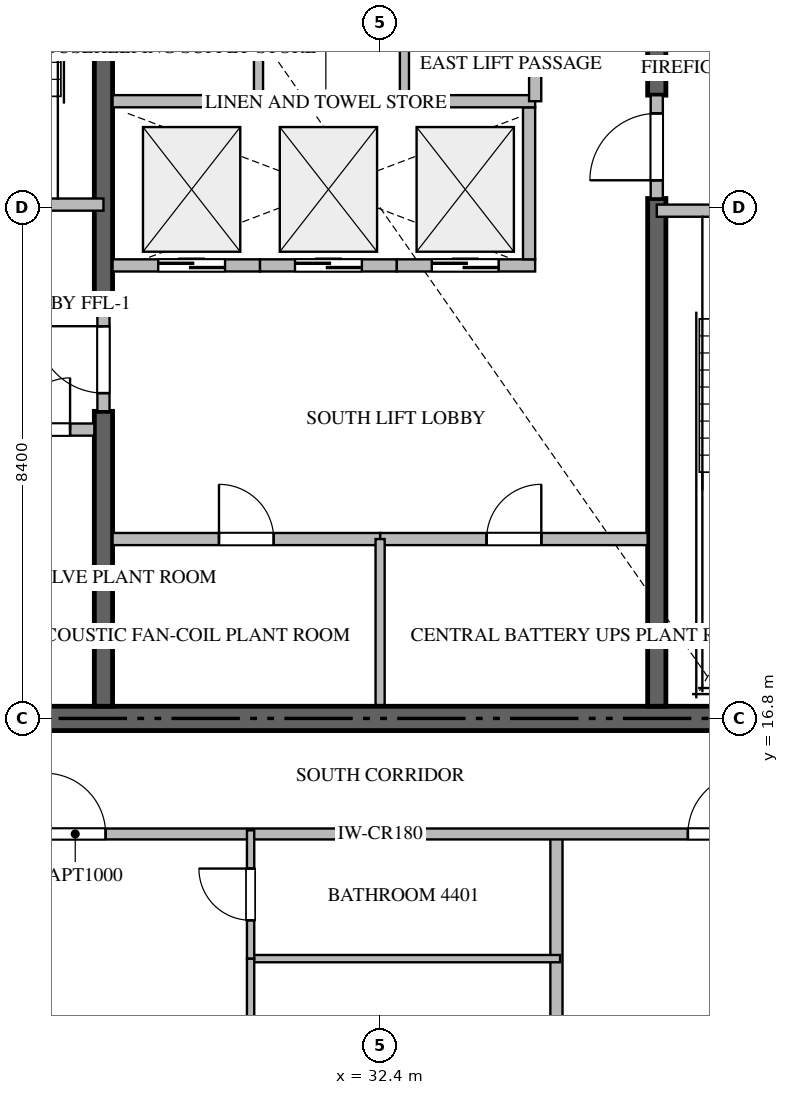
"""IFC4 building model, lengths in metres.
Left out: names, types, materials, properties, quantities, classifications, styles, units other than length and angle.
Written with IfcOpenShell. Run it as: python <this file> out.ifc"""

import sys

from ifc_helpers import new_model, si_unit, direction, frame, frame_2d, origin, place, context, subcontext, project, spatial, rectangle, extrude, source, transform, mapped, element, fill, save


model = new_model("IFC4")
c1 = context("Model", 3, precision=1e-05, world=origin(), true_north=direction((0.0, 1.0)))
c2 = subcontext(c1, "Body", "Model", "MODEL_VIEW")
j1 = project(units=[si_unit("LENGTHUNIT", "METRE"), si_unit("PLANEANGLEUNIT", "RADIAN")], contexts=[c1])
p1 = place(None, origin())
s1 = spatial("IfcSite", under=j1, at=p1, CompositionType="ELEMENT")
p2 = place(p1, origin())
s2 = spatial("IfcBuilding", under=s1, at=p2, CompositionType="ELEMENT")
p3 = place(p2, frame((0.0, 0.0, 176.4)))
s3 = spatial("IfcBuildingStorey", under=s2, at=p3, CompositionType="ELEMENT", Elevation=176.4)
p4 = place(p3, frame((23.4, 16.8, -0.26), z_axis=(0.0, 0.0, 1.0), x_axis=(1.0, 0.0, 0.0)))
e1 = element("IfcWall", 1, at=p4, inside=s3, PredefinedType="SHEAR", context=c2, shape_type="SweptSolid", body=[
    extrude(rectangle(XDim=18.0, YDim=0.4, at=frame_2d((9.0, 0.0))), origin(), (0.0, 0.0, 1.0), 3.748),
])
p5 = place(p3, frame((27.85, 17.0, -0.26), z_axis=(0.0, 0.0, 1.0), x_axis=(0.0, 1.0, 0.0)))
e2 = element("IfcWall", 2, at=p5, inside=s3, PredefinedType="SHEAR", context=c2, shape_type="SweptSolid", body=[
    extrude(rectangle(XDim=4.85, YDim=0.3, at=frame_2d((2.425, 0.0))), origin(), (0.0, 0.0, 1.0), 3.748),
])
p6 = place(p3, frame((27.85, 23.55, -0.26), z_axis=(0.0, 0.0, 1.0), x_axis=(0.0, 1.0, 0.0)))
e3 = element("IfcWall", 3, at=p6, inside=s3, PredefinedType="SHEAR", context=c2, shape_type="SweptSolid", body=[
    extrude(rectangle(XDim=9.85, YDim=0.3, at=frame_2d((4.925, 0.0))), origin(), (0.0, 0.0, 1.0), 3.748),
])
p7 = place(p3, frame((36.95, 17.0, -0.26), z_axis=(0.0, 0.0, 1.0), x_axis=(0.0, 1.0, 0.0)))
e4 = element("IfcWall", 4, at=p7, inside=s3, PredefinedType="SHEAR", context=c2, shape_type="SweptSolid", body=[
    extrude(rectangle(XDim=8.35, YDim=0.3, at=frame_2d((4.175, 0.0))), origin(), (0.0, 0.0, 1.0), 3.748),
])
p8 = place(p3, frame((36.95, 27.05, -0.26), z_axis=(0.0, 0.0, 1.0), x_axis=(0.0, 1.0, 0.0)))
e5 = element("IfcWall", 5, at=p8, inside=s3, PredefinedType="SHEAR", context=c2, shape_type="SweptSolid", body=[
    extrude(rectangle(XDim=6.35, YDim=0.3, at=frame_2d((3.175, 0.0))), origin(), (0.0, 0.0, 1.0), 3.748),
])
p9 = place(p3, frame((23.4, 25.25, 0.0), z_axis=(0.0, 0.0, 1.0), x_axis=(1.0, 0.0, 0.0)))
e6 = element("IfcWall", 6, at=p9, inside=s3, PredefinedType="STANDARD", context=c2, shape_type="SweptSolid", body=[
    extrude(rectangle(XDim=4.45, YDim=0.2, at=frame_2d((2.225, 0.0))), origin(), (0.0, 0.0, 1.0), 3.49),
])
p10 = place(p9, frame((1.65, 0.0, 0.0)))
e7 = element("IfcOpeningElement", 7, at=p10, cuts=e6, PredefinedType="OPENING", context=c2, shape_type="SweptSolid", body=[
    extrude(rectangle(XDim=1.1, YDim=2.15, at=frame_2d((0.55, 1.075))), frame((0.0, 0.11, 0.0), z_axis=(0.0, -1.0, 0.0), x_axis=(1.0, 0.0, 0.0)), (0.0, 0.0, 1.0), 0.22),
])
p11 = place(p3, frame((36.95, 25.15, 0.0), z_axis=(0.0, 0.0, 1.0), x_axis=(1.0, 0.0, 0.0)))
e8 = element("IfcWall", 8, at=p11, inside=s3, PredefinedType="STANDARD", context=c2, shape_type="SweptSolid", body=[
    extrude(rectangle(XDim=4.45, YDim=0.2, at=frame_2d((2.225, 0.0))), origin(), (0.0, 0.0, 1.0), 3.49),
])
p12 = place(p11, frame((1.65, 0.0, 0.0)))
e9 = element("IfcOpeningElement", 9, at=p12, cuts=e8, PredefinedType="OPENING", context=c2, shape_type="SweptSolid", body=[
    extrude(rectangle(XDim=1.1, YDim=2.15, at=frame_2d((0.55, 1.075))), frame((0.0, 0.11, 0.0), z_axis=(0.0, -1.0, 0.0), x_axis=(1.0, 0.0, 0.0)), (0.0, 0.0, 1.0), 0.22),
])
p13 = place(p3, frame((28.0, 24.25, 0.0), z_axis=(0.0, 0.0, 1.0), x_axis=(1.0, 0.0, 0.0)))
e10 = element("IfcWall", 10, at=p13, inside=s3, PredefinedType="STANDARD", context=c2, shape_type="SweptSolid", body=[
    extrude(rectangle(XDim=2.425, YDim=0.2, at=frame_2d((1.212, 0.0))), origin(), (0.0, 0.0, 1.0), 3.49),
])
p14 = place(p13, frame((0.75, 0.0, 0.0)))
e11 = element("IfcOpeningElement", 11, at=p14, cuts=e10, PredefinedType="OPENING", context=c2, shape_type="SweptSolid", body=[
    extrude(rectangle(XDim=1.1, YDim=2.2, at=frame_2d((0.55, 1.1))), frame((0.0, 0.11, 0.0), z_axis=(0.0, -1.0, 0.0), x_axis=(1.0, 0.0, 0.0)), (0.0, 0.0, 1.0), 0.22),
])
p15 = place(p3, frame((30.425, 24.25, 0.0), z_axis=(0.0, 0.0, 1.0), x_axis=(1.0, 0.0, 0.0)))
e12 = element("IfcWall", 12, at=p15, inside=s3, PredefinedType="STANDARD", context=c2, shape_type="SweptSolid", body=[
    extrude(rectangle(XDim=2.25, YDim=0.2, at=frame_2d((1.125, 0.0))), origin(), (0.0, 0.0, 1.0), 3.49),
])
p16 = place(p15, frame((0.575, 0.0, 0.0)))
e13 = element("IfcOpeningElement", 13, at=p16, cuts=e12, PredefinedType="OPENING", context=c2, shape_type="SweptSolid", body=[
    extrude(rectangle(XDim=1.1, YDim=2.2, at=frame_2d((0.55, 1.1))), frame((0.0, 0.11, 0.0), z_axis=(0.0, -1.0, 0.0), x_axis=(1.0, 0.0, 0.0)), (0.0, 0.0, 1.0), 0.22),
])
p17 = place(p3, frame((32.675, 24.25, 0.0), z_axis=(0.0, 0.0, 1.0), x_axis=(1.0, 0.0, 0.0)))
e14 = element("IfcWall", 14, at=p17, inside=s3, PredefinedType="STANDARD", context=c2, shape_type="SweptSolid", body=[
    extrude(rectangle(XDim=2.275, YDim=0.2, at=frame_2d((1.137, 0.0))), origin(), (0.0, 0.0, 1.0), 3.49),
])
p18 = place(p17, frame((0.575, 0.0, 0.0)))
e15 = element("IfcOpeningElement", 15, at=p18, cuts=e14, PredefinedType="OPENING", context=c2, shape_type="SweptSolid", body=[
    extrude(rectangle(XDim=1.1, YDim=2.2, at=frame_2d((0.55, 1.1))), frame((0.0, 0.11, 0.0), z_axis=(0.0, -1.0, 0.0), x_axis=(1.0, 0.0, 0.0)), (0.0, 0.0, 1.0), 0.22),
])
p19 = place(p3, frame((34.85, 24.35, 0.0), z_axis=(0.0, 0.0, 1.0), x_axis=(0.0, 1.0, 0.0)))
e16 = element("IfcWall", 16, at=p19, inside=s3, PredefinedType="STANDARD", context=c2, shape_type="SweptSolid", body=[
    extrude(rectangle(XDim=2.5, YDim=0.2, at=frame_2d((1.25, 0.0))), origin(), (0.0, 0.0, 1.0), 3.49),
])
p20 = place(p3, frame((26.052, 21.55, 0.0), z_axis=(0.0, 0.0, 1.0), x_axis=(1.0, 0.0, 0.0)))
e17 = element("IfcWall", 17, at=p20, inside=s3, PredefinedType="STANDARD", context=c2, shape_type="SweptSolid", body=[
    extrude(rectangle(XDim=1.648, YDim=0.2, at=frame_2d((0.824, 0.0))), origin(), (0.0, 0.0, 1.0), 3.49),
])
p21 = place(p20, frame((0.399, 0.0, 0.0)))
e18 = element("IfcOpeningElement", 18, at=p21, cuts=e17, PredefinedType="OPENING", context=c2, shape_type="SweptSolid", body=[
    extrude(rectangle(XDim=0.85, YDim=2.1, at=frame_2d((0.425, 1.05))), frame((0.0, 0.11, 0.0), z_axis=(0.0, -1.0, 0.0), x_axis=(1.0, 0.0, 0.0)), (0.0, 0.0, 1.0), 0.22),
])
p22 = place(p3, frame((27.85, 21.852, 0.0), z_axis=(0.0, 0.0, 1.0), x_axis=(0.0, 1.0, 0.0)))
e19 = element("IfcWall", 19, at=p22, inside=s3, PredefinedType="STANDARD", context=c2, shape_type="SweptSolid", body=[
    extrude(rectangle(XDim=1.696, YDim=0.2, at=frame_2d((0.848, 0.0))), origin(), (0.0, 0.0, 1.0), 3.49),
])
p23 = place(p22, frame((0.298, 0.0, 0.0)))
e20 = element("IfcOpeningElement", 20, at=p23, cuts=e19, PredefinedType="OPENING", context=c2, shape_type="SweptSolid", body=[
    extrude(rectangle(XDim=1.1, YDim=2.15, at=frame_2d((0.55, 1.075))), frame((0.0, 0.11, 0.0), z_axis=(0.0, -1.0, 0.0), x_axis=(1.0, 0.0, 0.0)), (0.0, 0.0, 1.0), 0.22),
])
p24 = place(p3, frame((36.95, 25.352, 0.0), z_axis=(0.0, 0.0, 1.0), x_axis=(0.0, 1.0, 0.0)))
e21 = element("IfcWall", 21, at=p24, inside=s3, PredefinedType="STANDARD", context=c2, shape_type="SweptSolid", body=[
    extrude(rectangle(XDim=1.696, YDim=0.2, at=frame_2d((0.848, 0.0))), origin(), (0.0, 0.0, 1.0), 3.49),
])
p25 = place(p24, frame((0.298, 0.0, 0.0)))
e22 = element("IfcOpeningElement", 22, at=p25, cuts=e21, PredefinedType="OPENING", context=c2, shape_type="SweptSolid", body=[
    extrude(rectangle(XDim=1.1, YDim=2.15, at=frame_2d((0.55, 1.075))), frame((0.0, 0.11, 0.0), z_axis=(0.0, -1.0, 0.0), x_axis=(1.0, 0.0, 0.0)), (0.0, 0.0, 1.0), 0.22),
])
p26 = place(p3, frame((28.0, 26.95, 0.0), z_axis=(0.0, 0.0, 1.0), x_axis=(1.0, 0.0, 0.0)))
e23 = element("IfcWall", 23, at=p26, inside=s3, PredefinedType="STANDARD", context=c2, shape_type="SweptSolid", body=[
    extrude(rectangle(XDim=6.95, YDim=0.2, at=frame_2d((3.475, 0.0))), origin(), (0.0, 0.0, 1.0), 3.49),
])
p27 = place(p3, frame((34.95, 26.95, 0.0), z_axis=(0.0, 0.0, 1.0), x_axis=(0.0, 1.0, 0.0)))
e24 = element("IfcWall", 24, at=p27, inside=s3, PredefinedType="STANDARD", context=c2, shape_type="SweptSolid", body=[
    extrude(rectangle(XDim=3.6, YDim=0.2, at=frame_2d((1.8, 0.0))), origin(), (0.0, 0.0, 1.0), 3.49),
])
p28 = place(p27, frame((1.35, 0.0, 0.0)))
e25 = element("IfcOpeningElement", 25, at=p28, cuts=e24, PredefinedType="OPENING", context=c2, shape_type="SweptSolid", body=[
    extrude(rectangle(XDim=0.9, YDim=2.1, at=frame_2d((0.45, 1.05))), frame((0.0, 0.11, 0.0), z_axis=(0.0, -1.0, 0.0), x_axis=(1.0, 0.0, 0.0)), (0.0, 0.0, 1.0), 0.22),
])
p29 = place(p3, frame((32.8, 26.95, 0.0), z_axis=(0.0, 0.0, 1.0), x_axis=(0.0, 1.0, 0.0)))
e26 = element("IfcWall", 26, at=p29, inside=s3, PredefinedType="PARTITIONING", context=c2, shape_type="SweptSolid", body=[
    extrude(rectangle(XDim=3.6, YDim=0.15, at=frame_2d((1.8, 0.0))), origin(), (0.0, 0.0, 1.0), 3.49),
])
p30 = place(p29, frame((1.375, 0.0, 0.0)))
e27 = element("IfcOpeningElement", 27, at=p30, cuts=e26, PredefinedType="OPENING", context=c2, shape_type="SweptSolid", body=[
    extrude(rectangle(XDim=0.85, YDim=2.1, at=frame_2d((0.425, 1.05))), frame((0.0, 0.085, 0.0), z_axis=(0.0, -1.0, 0.0), x_axis=(1.0, 0.0, 0.0)), (0.0, 0.0, 1.0), 0.17),
])
p31 = place(p3, frame((30.4, 26.95, 0.0), z_axis=(0.0, 0.0, 1.0), x_axis=(0.0, 1.0, 0.0)))
e28 = element("IfcWall", 28, at=p31, inside=s3, PredefinedType="PARTITIONING", context=c2, shape_type="SweptSolid", body=[
    extrude(rectangle(XDim=3.6, YDim=0.15, at=frame_2d((1.8, 0.0))), origin(), (0.0, 0.0, 1.0), 3.49),
])
p32 = place(p31, frame((1.375, 0.0, 0.0)))
e29 = element("IfcOpeningElement", 29, at=p32, cuts=e28, PredefinedType="OPENING", context=c2, shape_type="SweptSolid", body=[
    extrude(rectangle(XDim=0.85, YDim=2.1, at=frame_2d((0.425, 1.05))), frame((0.0, 0.085, 0.0), z_axis=(0.0, -1.0, 0.0), x_axis=(1.0, 0.0, 0.0)), (0.0, 0.0, 1.0), 0.17),
])
p33 = place(p3, frame((28.0, 19.75, 0.0), z_axis=(0.0, 0.0, 1.0), x_axis=(1.0, 0.0, 0.0)))
e30 = element("IfcWall", 30, at=p33, inside=s3, PredefinedType="STANDARD", context=c2, shape_type="SweptSolid", body=[
    extrude(rectangle(XDim=4.4, YDim=0.2, at=frame_2d((2.2, 0.0))), origin(), (0.0, 0.0, 1.0), 3.49),
])
p34 = place(p33, frame((1.75, 0.0, 0.0)))
e31 = element("IfcOpeningElement", 31, at=p34, cuts=e30, PredefinedType="OPENING", context=c2, shape_type="SweptSolid", body=[
    extrude(rectangle(XDim=0.9, YDim=2.1, at=frame_2d((0.45, 1.05))), frame((0.0, 0.11, 0.0), z_axis=(0.0, -1.0, 0.0), x_axis=(1.0, 0.0, 0.0)), (0.0, 0.0, 1.0), 0.22),
])
p35 = place(p3, frame((32.402, 19.75, 0.0), z_axis=(0.0, 0.0, 1.0), x_axis=(1.0, 0.0, 0.0)))
e32 = element("IfcWall", 32, at=p35, inside=s3, PredefinedType="STANDARD", context=c2, shape_type="SweptSolid", body=[
    extrude(rectangle(XDim=4.398, YDim=0.2, at=frame_2d((2.199, 0.0))), origin(), (0.0, 0.0, 1.0), 3.49),
])
p36 = place(p35, frame((1.749, 0.0, 0.0)))
e33 = element("IfcOpeningElement", 33, at=p36, cuts=e32, PredefinedType="OPENING", context=c2, shape_type="SweptSolid", body=[
    extrude(rectangle(XDim=0.9, YDim=2.1, at=frame_2d((0.45, 1.05))), frame((0.0, 0.11, 0.0), z_axis=(0.0, -1.0, 0.0), x_axis=(1.0, 0.0, 0.0)), (0.0, 0.0, 1.0), 0.22),
])
p37 = place(p3, frame((32.4, 17.02, 0.0), z_axis=(0.0, 0.0, 1.0), x_axis=(0.0, 1.0, 0.0)))
e34 = element("IfcWall", 34, at=p37, inside=s3, PredefinedType="PARTITIONING", context=c2, shape_type="SweptSolid", body=[
    extrude(rectangle(XDim=2.73, YDim=0.15, at=frame_2d((1.365, 0.0))), origin(), (0.0, 0.0, 1.0), 3.49),
])
p38 = place(p3, frame((35.3, 1.482, 0.0), z_axis=(0.0, 0.0, 1.0), x_axis=(0.0, 1.0, 0.0)))
e35 = element("IfcWall", 35, at=p38, inside=s3, PredefinedType="PARTITIONING", context=c2, shape_type="SweptSolid", body=[
    extrude(rectangle(XDim=13.418, YDim=0.2, at=frame_2d((6.709, 0.0))), origin(), (0.0, 0.0, 1.0), 3.49),
])
p39 = place(p3, frame((20.952, 14.9, 0.0), z_axis=(0.0, 0.0, 1.0), x_axis=(1.0, 0.0, 0.0)))
e36 = element("IfcWall", 36, at=p39, inside=s3, PredefinedType="PARTITIONING", context=c2, shape_type="SweptSolid", body=[
    extrude(rectangle(XDim=22.896, YDim=0.18, at=frame_2d((11.448, 0.0))), origin(), (0.0, 0.0, 1.0), 3.49),
])
p40 = place(p39, frame((5.934, 0.0, 0.0)))
e37 = element("IfcOpeningElement", 37, at=p40, cuts=e36, PredefinedType="OPENING", context=c2, shape_type="SweptSolid", body=[
    extrude(rectangle(XDim=1.0, YDim=2.15, at=frame_2d((0.5, 1.075))), frame((0.0, 0.1, 0.0), z_axis=(0.0, -1.0, 0.0), x_axis=(1.0, 0.0, 0.0)), (0.0, 0.0, 1.0), 0.2),
])
p41 = place(p39, frame((16.51, 0.0, 0.0)))
e38 = element("IfcOpeningElement", 38, at=p41, cuts=e36, PredefinedType="OPENING", context=c2, shape_type="SweptSolid", body=[
    extrude(rectangle(XDim=1.0, YDim=2.15, at=frame_2d((0.5, 1.075))), frame((0.0, 0.1, 0.0), z_axis=(0.0, -1.0, 0.0), x_axis=(1.0, 0.0, 0.0)), (0.0, 0.0, 1.0), 0.2),
])
p42 = place(p3, frame((30.27, 12.85, 0.0), z_axis=(0.0, 0.0, 1.0), x_axis=(1.0, 0.0, 0.0)))
e39 = element("IfcWall", 39, at=p42, inside=s3, PredefinedType="PARTITIONING", context=c2, shape_type="SweptSolid", body=[
    extrude(rectangle(XDim=5.09, YDim=0.12, at=frame_2d((2.545, 0.0))), origin(), (0.0, 0.0, 1.0), 3.49),
])
p43 = place(p3, frame((30.27, 7.521, 0.0), z_axis=(0.0, 0.0, 1.0), x_axis=(0.0, 1.0, 0.0)))
e40 = element("IfcWall", 40, at=p43, inside=s3, PredefinedType="PARTITIONING", context=c2, shape_type="SweptSolid", body=[
    extrude(rectangle(XDim=5.329, YDim=0.12, at=frame_2d((2.665, 0.0))), origin(), (0.0, 0.0, 1.0), 3.49),
])
p44 = place(p43, frame((2.24, 0.0, 0.0)))
e41 = element("IfcOpeningElement", 41, at=p44, cuts=e40, PredefinedType="OPENING", context=c2, shape_type="SweptSolid", body=[
    extrude(rectangle(XDim=0.85, YDim=2.1, at=frame_2d((0.425, 1.05))), frame((0.0, 0.07, 0.0), z_axis=(0.0, -1.0, 0.0), x_axis=(1.0, 0.0, 0.0)), (0.0, 0.0, 1.0), 0.14),
])
p45 = place(p3, frame((30.27, 12.852, 0.0), z_axis=(0.0, 0.0, 1.0), x_axis=(0.0, 1.0, 0.0)))
e42 = element("IfcWall", 42, at=p45, inside=s3, PredefinedType="PARTITIONING", context=c2, shape_type="SweptSolid", body=[
    extrude(rectangle(XDim=2.108, YDim=0.12, at=frame_2d((1.054, 0.0))), origin(), (0.0, 0.0, 1.0), 3.49),
])
p46 = place(p45, frame((0.629, 0.0, 0.0)))
e43 = element("IfcOpeningElement", 43, at=p46, cuts=e42, PredefinedType="OPENING", context=c2, shape_type="SweptSolid", body=[
    extrude(rectangle(XDim=0.85, YDim=2.1, at=frame_2d((0.425, 1.05))), frame((0.0, 0.07, 0.0), z_axis=(0.0, -1.0, 0.0), x_axis=(1.0, 0.0, 0.0)), (0.0, 0.0, 1.0), 0.14),
])
m1 = source(origin(), c2, "Body", "SweptSolid", [
    extrude(rectangle(XDim=1.1, YDim=2.2, at=frame_2d((0.55, 1.1))), frame((0.0, 0.025, 0.0), z_axis=(0.0, -1.0, 0.0), x_axis=(1.0, 0.0, 0.0)), (0.0, 0.0, 1.0), 0.05),
])
p47 = place(p14, origin())
e44 = element("IfcDoor", 44, at=p47, inside=s3, OperationType="DOUBLE_DOOR_SLIDING", PredefinedType="DOOR", context=c2, shape_type="MappedRepresentation", body=[
    mapped(m1, transform((0.0, 0.0, 0.0), scale=1.0)),
])
fill(e11, e44)
p48 = place(p16, origin())
e45 = element("IfcDoor", 45, at=p48, inside=s3, OperationType="DOUBLE_DOOR_SLIDING", PredefinedType="DOOR", context=c2, shape_type="MappedRepresentation", body=[
    mapped(m1, transform((0.0, 0.0, 0.0), scale=1.0)),
])
fill(e13, e45)
p49 = place(p18, origin())
e46 = element("IfcDoor", 46, at=p49, inside=s3, OperationType="DOUBLE_DOOR_SLIDING", PredefinedType="DOOR", context=c2, shape_type="MappedRepresentation", body=[
    mapped(m1, transform((0.0, 0.0, 0.0), scale=1.0)),
])
fill(e15, e46)
m2 = source(origin(), c2, "Body", "SweptSolid", [
    extrude(rectangle(XDim=0.85, YDim=2.1, at=frame_2d((0.425, 1.05))), frame((0.0, 0.025, 0.0), z_axis=(0.0, -1.0, 0.0), x_axis=(1.0, 0.0, 0.0)), (0.0, 0.0, 1.0), 0.05),
])
p50 = place(p21, origin())
e47 = element("IfcDoor", 47, at=p50, inside=s3, OperationType="SINGLE_SWING_RIGHT", PredefinedType="DOOR", context=c2, shape_type="MappedRepresentation", body=[
    mapped(m2, transform((0.0, 0.0, 0.0), scale=1.0)),
])
fill(e18, e47)
m3 = source(origin(), c2, "Body", "SweptSolid", [
    extrude(rectangle(XDim=1.1, YDim=2.15, at=frame_2d((0.55, 1.075))), frame((0.0, 0.025, 0.0), z_axis=(0.0, -1.0, 0.0), x_axis=(1.0, 0.0, 0.0)), (0.0, 0.0, 1.0), 0.05),
])
p51 = place(p23, origin())
e48 = element("IfcDoor", 48, at=p51, inside=s3, OperationType="SINGLE_SWING_RIGHT", PredefinedType="DOOR", context=c2, shape_type="MappedRepresentation", body=[
    mapped(m3, transform((0.0, 0.0, 0.0), scale=1.0)),
])
fill(e20, e48)
p52 = place(p25, origin())
e49 = element("IfcDoor", 49, at=p52, inside=s3, OperationType="SINGLE_SWING_LEFT", PredefinedType="DOOR", context=c2, shape_type="MappedRepresentation", body=[
    mapped(m3, transform((0.0, 0.0, 0.0), scale=1.0)),
])
fill(e22, e49)
m4 = source(origin(), c2, "Body", "SweptSolid", [
    extrude(rectangle(XDim=0.9, YDim=2.1, at=frame_2d((0.45, 1.05))), frame((0.0, 0.025, 0.0), z_axis=(0.0, -1.0, 0.0), x_axis=(1.0, 0.0, 0.0)), (0.0, 0.0, 1.0), 0.05),
])
p53 = place(p34, origin())
e50 = element("IfcDoor", 50, at=p53, inside=s3, OperationType="SINGLE_SWING_LEFT", PredefinedType="DOOR", context=c2, shape_type="MappedRepresentation", body=[
    mapped(m4, transform((0.0, 0.0, 0.0), scale=1.0)),
])
fill(e31, e50)
p54 = place(p36, origin())
e51 = element("IfcDoor", 51, at=p54, inside=s3, OperationType="SINGLE_SWING_RIGHT", PredefinedType="DOOR", context=c2, shape_type="MappedRepresentation", body=[
    mapped(m4, transform((0.0, 0.0, 0.0), scale=1.0)),
])
fill(e33, e51)
m5 = source(origin(), c2, "Body", "SweptSolid", [
    extrude(rectangle(XDim=1.0, YDim=2.15, at=frame_2d((0.5, 1.075))), frame((0.0, 0.025, 0.0), z_axis=(0.0, -1.0, 0.0), x_axis=(1.0, 0.0, 0.0)), (0.0, 0.0, 1.0), 0.05),
])
p55 = place(p40, origin())
e52 = element("IfcDoor", 52, at=p55, inside=s3, OperationType="SINGLE_SWING_LEFT", PredefinedType="DOOR", context=c2, shape_type="MappedRepresentation", body=[
    mapped(m5, transform((0.0, 0.0, 0.0), scale=1.0)),
])
fill(e37, e52)
p56 = place(p41, origin())
e53 = element("IfcDoor", 53, at=p56, inside=s3, OperationType="SINGLE_SWING_RIGHT", PredefinedType="DOOR", context=c2, shape_type="MappedRepresentation", body=[
    mapped(m5, transform((0.0, 0.0, 0.0), scale=1.0)),
])
fill(e38, e53)
p57 = place(p46, origin())
e54 = element("IfcDoor", 54, at=p57, inside=s3, OperationType="SINGLE_SWING_RIGHT", PredefinedType="DOOR", context=c2, shape_type="MappedRepresentation", body=[
    mapped(m2, transform((0.0, 0.0, 0.0), scale=1.0)),
])
fill(e43, e54)
save(model, sys.argv[1])
